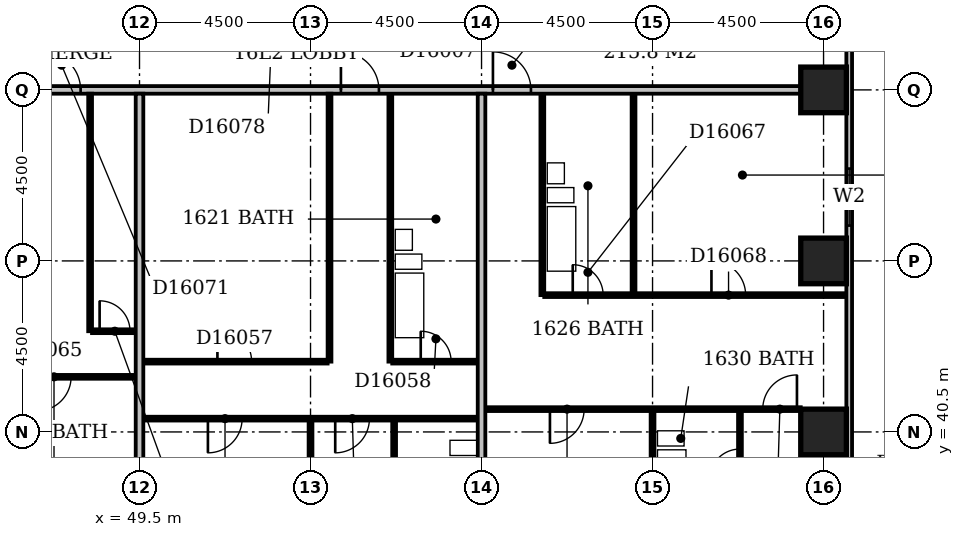
"""IFC4 building model, lengths in metres.
Left out: names, types, materials, properties, quantities, classifications, styles, units other than length and angle.
Written with IfcOpenShell. Run it as: python <this file> out.ifc"""

import sys

from ifc_helpers import new_model, si_unit, direction, frame, frame_2d, origin, origin_2d, place, context, subcontext, project, spatial, rectangle, extrude, element, fill, save


model = new_model("IFC4")
c1 = context("Model", 3, precision=1e-05, world=origin(), true_north=direction((0.0, 1.0)))
c2 = subcontext(c1, "Body", "Model", "MODEL_VIEW")
j1 = project(units=[si_unit("LENGTHUNIT", "METRE"), si_unit("PLANEANGLEUNIT", "RADIAN")], contexts=[c1])
p1 = place(None, origin())
s1 = spatial("IfcSite", under=j1, at=p1, CompositionType="ELEMENT")
p2 = place(p1, origin())
s2 = spatial("IfcBuilding", under=s1, at=p2, CompositionType="ELEMENT")
p3 = place(p2, frame((0.0, 0.0, 68.6)))
s3 = spatial("IfcBuildingStorey", under=s2, at=p3, CompositionType="ELEMENT", Elevation=68.6)
for number, where, z_axis, x_axis in (
    (1, (67.5, 40.5, -0.3), (0.0, 0.0, 1.0), (1.0, 0.0, 0.0)),
    (2, (67.5, 45.0, -0.3), (0.0, 0.0, 1.0), (1.0, 0.0, 0.0)),
    (3, (67.5, 49.5, -0.3), (0.0, 0.0, 1.0), (1.0, 0.0, 0.0)),
):
    element("IfcColumn", number, at=place(p3, frame(where, z_axis=z_axis, x_axis=x_axis)), inside=s3, PredefinedType="COLUMN", context=c2, shape_type="SweptSolid", body=[
        extrude(rectangle(XDim=1.2, YDim=1.2, at=origin_2d()), origin(), (0.0, 0.0, 1.0), 3.6),
    ])
p4 = place(p3, frame((68.175, 35.4, 0.0), z_axis=(0.0, 0.0, 1.0), x_axis=(0.0, 1.0, 0.0)))
e4 = element("IfcWall", 4, at=p4, inside=s3, PredefinedType="STANDARD", context=c2, shape_type="SweptSolid", body=[
    extrude(rectangle(XDim=23.85, YDim=0.15, at=frame_2d((11.925, 0.0))), origin(), (0.0, 0.0, 1.0), 2.7),
])
p5 = place(p4, frame((1.65, 0.0, 0.6)))
e5 = element("IfcOpeningElement", 5, at=p5, cuts=e4, PredefinedType="OPENING", context=c2, shape_type="SweptSolid", body=[
    extrude(rectangle(XDim=2.4, YDim=1.8, at=frame_2d((1.2, 0.9))), frame((0.0, 0.087, 0.0), z_axis=(0.0, -1.0, 0.0), x_axis=(1.0, 0.0, 0.0)), (0.0, 0.0, 1.0), 0.174),
])
p6 = place(p4, frame((10.53, 0.0, 0.6)))
e6 = element("IfcOpeningElement", 6, at=p6, cuts=e4, PredefinedType="OPENING", context=c2, shape_type="SweptSolid", body=[
    extrude(rectangle(XDim=1.5, YDim=1.8, at=frame_2d((0.75, 0.9))), frame((0.0, 0.087, 0.0), z_axis=(0.0, -1.0, 0.0), x_axis=(1.0, 0.0, 0.0)), (0.0, 0.0, 1.0), 0.174),
])
p7 = place(p4, frame((19.65, 0.0, 0.6)))
e7 = element("IfcOpeningElement", 7, at=p7, cuts=e4, PredefinedType="OPENING", context=c2, shape_type="SweptSolid", body=[
    extrude(rectangle(XDim=2.4, YDim=1.8, at=frame_2d((1.2, 0.9))), frame((0.0, 0.087, 0.0), z_axis=(0.0, -1.0, 0.0), x_axis=(1.0, 0.0, 0.0)), (0.0, 0.0, 1.0), 0.174),
])
p8 = place(p3, frame((49.5, 36.6, 0.0), z_axis=(0.0, 0.0, 1.0), x_axis=(0.0, 1.0, 0.0)))
e8 = element("IfcWall", 8, at=p8, inside=s3, PredefinedType="PARTITIONING", context=c2, shape_type="SweptSolid", body=[
    extrude(rectangle(XDim=12.8, YDim=0.2, at=frame_2d((6.4, 0.0))), origin(), (0.0, 0.0, 1.0), 3.3),
])
p9 = place(p3, frame((54.0, 36.6, 0.0), z_axis=(0.0, 0.0, 1.0), x_axis=(0.0, 1.0, 0.0)))
e9 = element("IfcWall", 9, at=p9, inside=s3, PredefinedType="PARTITIONING", context=c2, shape_type="SweptSolid", body=[
    extrude(rectangle(XDim=4.2, YDim=0.1, at=frame_2d((2.1, 0.0))), origin(), (0.0, 0.0, 1.0), 2.6),
])
p10 = place(p3, frame((58.5, 36.6, 0.0), z_axis=(0.0, 0.0, 1.0), x_axis=(0.0, 1.0, 0.0)))
e10 = element("IfcWall", 10, at=p10, inside=s3, PredefinedType="PARTITIONING", context=c2, shape_type="SweptSolid", body=[
    extrude(rectangle(XDim=12.8, YDim=0.2, at=frame_2d((6.4, 0.0))), origin(), (0.0, 0.0, 1.0), 3.3),
])
p11 = place(p3, frame((63.0, 36.6, 0.0), z_axis=(0.0, 0.0, 1.0), x_axis=(0.0, 1.0, 0.0)))
e11 = element("IfcWall", 11, at=p11, inside=s3, PredefinedType="PARTITIONING", context=c2, shape_type="SweptSolid", body=[
    extrude(rectangle(XDim=4.45, YDim=0.1, at=frame_2d((2.225, 0.0))), origin(), (0.0, 0.0, 1.0), 2.4),
])
p12 = place(p3, frame((56.2, 37.95, 0.0), z_axis=(0.0, 0.0, 1.0), x_axis=(0.0, 1.0, 0.0)))
e12 = element("IfcWall", 12, at=p12, inside=s3, PredefinedType="PLUMBINGWALL", context=c2, shape_type="SweptSolid", body=[
    extrude(rectangle(XDim=2.85, YDim=0.1, at=frame_2d((1.425, 0.0))), origin(), (0.0, 0.0, 1.0), 3.3),
])
p13 = place(p12, frame((1.05, 0.0, 0.0)))
e13 = element("IfcOpeningElement", 13, at=p13, cuts=e12, PredefinedType="OPENING", context=c2, shape_type="SweptSolid", body=[
    extrude(rectangle(XDim=0.8, YDim=2.1, at=frame_2d((0.4, 1.05))), frame((0.0, 0.062, 0.0), z_axis=(0.0, -1.0, 0.0), x_axis=(1.0, 0.0, 0.0)), (0.0, 0.0, 1.0), 0.124),
])
p14 = place(p3, frame((65.3, 38.2, 0.0), z_axis=(0.0, 0.0, 1.0), x_axis=(0.0, 1.0, 0.0)))
e14 = element("IfcWall", 14, at=p14, inside=s3, PredefinedType="PLUMBINGWALL", context=c2, shape_type="SweptSolid", body=[
    extrude(rectangle(XDim=2.85, YDim=0.1, at=frame_2d((1.425, 0.0))), origin(), (0.0, 0.0, 1.0), 3.3),
])
p15 = place(p14, frame((1.05, 0.0, 0.0)))
e15 = element("IfcOpeningElement", 15, at=p15, cuts=e14, PredefinedType="OPENING", context=c2, shape_type="SweptSolid", body=[
    extrude(rectangle(XDim=0.8, YDim=2.1, at=frame_2d((0.4, 1.05))), frame((0.0, 0.062, 0.0), z_axis=(0.0, -1.0, 0.0), x_axis=(1.0, 0.0, 0.0)), (0.0, 0.0, 1.0), 0.124),
])
p16 = place(p3, frame((49.6, 40.85, 0.0), z_axis=(0.0, 0.0, 1.0), x_axis=(1.0, 0.0, 0.0)))
e16 = element("IfcWall", 16, at=p16, inside=s3, PredefinedType="PARTITIONING", context=c2, shape_type="SweptSolid", body=[
    extrude(rectangle(XDim=8.8, YDim=0.1, at=frame_2d((4.4, 0.0))), origin(), (0.0, 0.0, 1.0), 3.3),
])
p17 = place(p16, frame((1.7, 0.0, 0.0)))
e17 = element("IfcOpeningElement", 17, at=p17, cuts=e16, PredefinedType="OPENING", context=c2, shape_type="SweptSolid", body=[
    extrude(rectangle(XDim=0.9, YDim=2.1, at=frame_2d((0.45, 1.05))), frame((0.0, 0.062, 0.0), z_axis=(0.0, -1.0, 0.0), x_axis=(1.0, 0.0, 0.0)), (0.0, 0.0, 1.0), 0.124),
])
p18 = place(p16, frame((5.05, 0.0, 0.0)))
e18 = element("IfcOpeningElement", 18, at=p18, cuts=e16, PredefinedType="OPENING", context=c2, shape_type="SweptSolid", body=[
    extrude(rectangle(XDim=0.9, YDim=2.1, at=frame_2d((0.45, 1.05))), frame((0.0, 0.062, 0.0), z_axis=(0.0, -1.0, 0.0), x_axis=(1.0, 0.0, 0.0)), (0.0, 0.0, 1.0), 0.124),
])
p19 = place(p3, frame((58.6, 41.1, 0.0), z_axis=(0.0, 0.0, 1.0), x_axis=(1.0, 0.0, 0.0)))
e19 = element("IfcWall", 19, at=p19, inside=s3, PredefinedType="PARTITIONING", context=c2, shape_type="SweptSolid", body=[
    extrude(rectangle(XDim=8.3, YDim=0.1, at=frame_2d((4.15, 0.0))), origin(), (0.0, 0.0, 1.0), 3.3),
])
p20 = place(p19, frame((1.7, 0.0, 0.0)))
e20 = element("IfcOpeningElement", 20, at=p20, cuts=e19, PredefinedType="OPENING", context=c2, shape_type="SweptSolid", body=[
    extrude(rectangle(XDim=0.9, YDim=2.1, at=frame_2d((0.45, 1.05))), frame((0.0, 0.062, 0.0), z_axis=(0.0, -1.0, 0.0), x_axis=(1.0, 0.0, 0.0)), (0.0, 0.0, 1.0), 0.124),
])
p21 = place(p19, frame((7.3, 0.0, 0.0)))
e21 = element("IfcOpeningElement", 21, at=p21, cuts=e19, PredefinedType="OPENING", context=c2, shape_type="SweptSolid", body=[
    extrude(rectangle(XDim=0.9, YDim=2.1, at=frame_2d((0.45, 1.05))), frame((0.0, 0.062, 0.0), z_axis=(0.0, -1.0, 0.0), x_axis=(1.0, 0.0, 0.0)), (0.0, 0.0, 1.0), 0.124),
])
p22 = place(p3, frame((45.1, 41.95, 0.0), z_axis=(0.0, 0.0, 1.0), x_axis=(1.0, 0.0, 0.0)))
e22 = element("IfcWall", 22, at=p22, inside=s3, PredefinedType="PARTITIONING", context=c2, shape_type="SweptSolid", body=[
    extrude(rectangle(XDim=4.3, YDim=0.1, at=frame_2d((2.15, 0.0))), origin(), (0.0, 0.0, 1.0), 3.3),
])
p23 = place(p22, frame((1.7, 0.0, 0.0)))
e23 = element("IfcOpeningElement", 23, at=p23, cuts=e22, PredefinedType="OPENING", context=c2, shape_type="SweptSolid", body=[
    extrude(rectangle(XDim=0.9, YDim=2.1, at=frame_2d((0.45, 1.05))), frame((0.0, 0.062, 0.0), z_axis=(0.0, -1.0, 0.0), x_axis=(1.0, 0.0, 0.0)), (0.0, 0.0, 1.0), 0.124),
])
p24 = place(p3, frame((49.6, 42.35, 0.0), z_axis=(0.0, 0.0, 1.0), x_axis=(1.0, 0.0, 0.0)))
e24 = element("IfcWall", 24, at=p24, inside=s3, PredefinedType="PARTITIONING", context=c2, shape_type="SweptSolid", body=[
    extrude(rectangle(XDim=4.85, YDim=0.1, at=frame_2d((2.425, 0.0))), origin(), (0.0, 0.0, 1.0), 3.3),
])
p25 = place(p24, frame((1.95, 0.0, 0.0)))
e25 = element("IfcOpeningElement", 25, at=p25, cuts=e24, PredefinedType="OPENING", context=c2, shape_type="SweptSolid", body=[
    extrude(rectangle(XDim=0.9, YDim=2.1, at=frame_2d((0.45, 1.05))), frame((0.0, 0.062, 0.0), z_axis=(0.0, -1.0, 0.0), x_axis=(1.0, 0.0, 0.0)), (0.0, 0.0, 1.0), 0.124),
])
p26 = place(p3, frame((54.5, 42.35, 0.0), z_axis=(0.0, 0.0, 1.0), x_axis=(0.0, 1.0, 0.0)))
e26 = element("IfcWall", 26, at=p26, inside=s3, PredefinedType="PARTITIONING", context=c2, shape_type="SweptSolid", body=[
    extrude(rectangle(XDim=7.05, YDim=0.1, at=frame_2d((3.525, 0.0))), origin(), (0.0, 0.0, 1.0), 2.6),
])
p27 = place(p3, frame((56.1, 42.35, 0.0), z_axis=(0.0, 0.0, 1.0), x_axis=(0.0, 1.0, 0.0)))
e27 = element("IfcWall", 27, at=p27, inside=s3, PredefinedType="PLUMBINGWALL", context=c2, shape_type="SweptSolid", body=[
    extrude(rectangle(XDim=7.05, YDim=0.1, at=frame_2d((3.525, 0.0))), origin(), (0.0, 0.0, 1.0), 3.3),
])
p28 = place(p3, frame((56.15, 42.35, 0.0), z_axis=(0.0, 0.0, 1.0), x_axis=(1.0, 0.0, 0.0)))
e28 = element("IfcWall", 28, at=p28, inside=s3, PredefinedType="PARTITIONING", context=c2, shape_type="SweptSolid", body=[
    extrude(rectangle(XDim=2.25, YDim=0.1, at=frame_2d((1.125, 0.0))), origin(), (0.0, 0.0, 1.0), 3.3),
])
p29 = place(p28, frame((0.75, 0.0, 0.0)))
e29 = element("IfcOpeningElement", 29, at=p29, cuts=e28, PredefinedType="OPENING", context=c2, shape_type="SweptSolid", body=[
    extrude(rectangle(XDim=0.8, YDim=2.1, at=frame_2d((0.4, 1.05))), frame((0.0, 0.062, 0.0), z_axis=(0.0, -1.0, 0.0), x_axis=(1.0, 0.0, 0.0)), (0.0, 0.0, 1.0), 0.124),
])
p30 = place(p3, frame((48.2, 43.15, 0.0), z_axis=(0.0, 0.0, 1.0), x_axis=(0.0, 1.0, 0.0)))
e30 = element("IfcWall", 30, at=p30, inside=s3, PredefinedType="PARTITIONING", context=c2, shape_type="SweptSolid", body=[
    extrude(rectangle(XDim=6.25, YDim=0.1, at=frame_2d((3.125, 0.0))), origin(), (0.0, 0.0, 1.0), 3.3),
])
p31 = place(p3, frame((48.25, 43.15, 0.0), z_axis=(0.0, 0.0, 1.0), x_axis=(1.0, 0.0, 0.0)))
e31 = element("IfcWall", 31, at=p31, inside=s3, PredefinedType="PARTITIONING", context=c2, shape_type="SweptSolid", body=[
    extrude(rectangle(XDim=1.15, YDim=0.1, at=frame_2d((0.575, 0.0))), origin(), (0.0, 0.0, 1.0), 3.3),
])
p32 = place(p31, frame((0.2, 0.0, 0.0)))
e32 = element("IfcOpeningElement", 32, at=p32, cuts=e31, PredefinedType="OPENING", context=c2, shape_type="SweptSolid", body=[
    extrude(rectangle(XDim=0.8, YDim=2.1, at=frame_2d((0.4, 1.05))), frame((0.0, 0.062, 0.0), z_axis=(0.0, -1.0, 0.0), x_axis=(1.0, 0.0, 0.0)), (0.0, 0.0, 1.0), 0.124),
])
p33 = place(p3, frame((60.1, 44.1, 0.0), z_axis=(0.0, 0.0, 1.0), x_axis=(0.0, 1.0, 0.0)))
e33 = element("IfcWall", 33, at=p33, inside=s3, PredefinedType="PLUMBINGWALL", context=c2, shape_type="SweptSolid", body=[
    extrude(rectangle(XDim=5.3, YDim=0.1, at=frame_2d((2.65, 0.0))), origin(), (0.0, 0.0, 1.0), 3.3),
])
p34 = place(p3, frame((60.15, 44.1, 0.0), z_axis=(0.0, 0.0, 1.0), x_axis=(1.0, 0.0, 0.0)))
e34 = element("IfcWall", 34, at=p34, inside=s3, PredefinedType="PARTITIONING", context=c2, shape_type="SweptSolid", body=[
    extrude(rectangle(XDim=7.95, YDim=0.1, at=frame_2d((3.975, 0.0))), origin(), (0.0, 0.0, 1.0), 3.3),
])
p35 = place(p34, frame((0.75, 0.0, 0.0)))
e35 = element("IfcOpeningElement", 35, at=p35, cuts=e34, PredefinedType="OPENING", context=c2, shape_type="SweptSolid", body=[
    extrude(rectangle(XDim=0.8, YDim=2.1, at=frame_2d((0.4, 1.05))), frame((0.0, 0.062, 0.0), z_axis=(0.0, -1.0, 0.0), x_axis=(1.0, 0.0, 0.0)), (0.0, 0.0, 1.0), 0.124),
])
p36 = place(p34, frame((4.4, 0.0, 0.0)))
e36 = element("IfcOpeningElement", 36, at=p36, cuts=e34, PredefinedType="OPENING", context=c2, shape_type="SweptSolid", body=[
    extrude(rectangle(XDim=0.9, YDim=2.1, at=frame_2d((0.45, 1.05))), frame((0.0, 0.062, 0.0), z_axis=(0.0, -1.0, 0.0), x_axis=(1.0, 0.0, 0.0)), (0.0, 0.0, 1.0), 0.124),
])
p37 = place(p3, frame((62.5, 44.15, 0.0), z_axis=(0.0, 0.0, 1.0), x_axis=(0.0, 1.0, 0.0)))
e37 = element("IfcWall", 37, at=p37, inside=s3, PredefinedType="PLUMBINGWALL", context=c2, shape_type="SweptSolid", body=[
    extrude(rectangle(XDim=5.25, YDim=0.1, at=frame_2d((2.625, 0.0))), origin(), (0.0, 0.0, 1.0), 2.4),
])
p38 = place(p3, frame((9.1, 49.5, 0.0), z_axis=(0.0, 0.0, 1.0), x_axis=(1.0, 0.0, 0.0)))
e38 = element("IfcWall", 38, at=p38, inside=s3, PredefinedType="PARTITIONING", context=c2, shape_type="SweptSolid", body=[
    extrude(rectangle(XDim=57.8, YDim=0.2, at=frame_2d((28.9, 0.0))), origin(), (0.0, 0.0, 1.0), 3.3),
])
p39 = place(p38, frame((13.7, 0.0, 0.0)))
e39 = element("IfcOpeningElement", 39, at=p39, cuts=e38, PredefinedType="OPENING", context=c2, shape_type="SweptSolid", body=[
    extrude(rectangle(XDim=1.0, YDim=2.1, at=frame_2d((0.5, 1.05))), frame((0.0, 0.112, 0.0), z_axis=(0.0, -1.0, 0.0), x_axis=(1.0, 0.0, 0.0)), (0.0, 0.0, 1.0), 0.224),
])
p40 = place(p38, frame((32.2, 0.0, 0.0)))
e40 = element("IfcOpeningElement", 40, at=p40, cuts=e38, PredefinedType="OPENING", context=c2, shape_type="SweptSolid", body=[
    extrude(rectangle(XDim=1.0, YDim=2.1, at=frame_2d((0.5, 1.05))), frame((0.0, 0.112, 0.0), z_axis=(0.0, -1.0, 0.0), x_axis=(1.0, 0.0, 0.0)), (0.0, 0.0, 1.0), 0.224),
])
p41 = place(p38, frame((37.85, 0.0, 0.0)))
e41 = element("IfcOpeningElement", 41, at=p41, cuts=e38, PredefinedType="OPENING", context=c2, shape_type="SweptSolid", body=[
    extrude(rectangle(XDim=1.0, YDim=2.1, at=frame_2d((0.5, 1.05))), frame((0.0, 0.112, 0.0), z_axis=(0.0, -1.0, 0.0), x_axis=(1.0, 0.0, 0.0)), (0.0, 0.0, 1.0), 0.224),
])
p42 = place(p38, frame((45.7, 0.0, 0.0)))
e42 = element("IfcOpeningElement", 42, at=p42, cuts=e38, PredefinedType="OPENING", context=c2, shape_type="SweptSolid", body=[
    extrude(rectangle(XDim=1.0, YDim=2.1, at=frame_2d((0.5, 1.05))), frame((0.0, 0.112, 0.0), z_axis=(0.0, -1.0, 0.0), x_axis=(1.0, 0.0, 0.0)), (0.0, 0.0, 1.0), 0.224),
])
p43 = place(p38, frame((49.7, 0.0, 0.0)))
e43 = element("IfcOpeningElement", 43, at=p43, cuts=e38, PredefinedType="OPENING", context=c2, shape_type="SweptSolid", body=[
    extrude(rectangle(XDim=1.0, YDim=2.1, at=frame_2d((0.5, 1.05))), frame((0.0, 0.112, 0.0), z_axis=(0.0, -1.0, 0.0), x_axis=(1.0, 0.0, 0.0)), (0.0, 0.0, 1.0), 0.224),
])
p44 = place(p38, frame((8.4, 0.0, 0.0)))
e44 = element("IfcOpeningElement", 44, at=p44, cuts=e38, PredefinedType="OPENING", context=c2, shape_type="SweptSolid", body=[
    extrude(rectangle(XDim=0.9, YDim=2.1, at=frame_2d((0.45, 1.05))), frame((0.0, 0.112, 0.0), z_axis=(0.0, -1.0, 0.0), x_axis=(1.0, 0.0, 0.0)), (0.0, 0.0, 1.0), 0.224),
])
p45 = place(p6, origin())
e45 = element("IfcWindow", 45, at=p45, inside=s3, PartitioningType="SINGLE_PANEL", PredefinedType="WINDOW", context=c2, shape_type="SweptSolid", body=[
    extrude(rectangle(XDim=1.5, YDim=1.8, at=frame_2d((0.75, 0.9))), frame((0.0, 0.03, 0.0), z_axis=(0.0, -1.0, 0.0), x_axis=(1.0, 0.0, 0.0)), (0.0, 0.0, 1.0), 0.06),
])
fill(e6, e45)
p46 = place(p15, origin())
e46 = element("IfcDoor", 46, at=p46, inside=s3, OperationType="SINGLE_SWING_LEFT", PredefinedType="DOOR", context=c2, shape_type="SweptSolid", body=[
    extrude(rectangle(XDim=0.8, YDim=2.1, at=frame_2d((0.4, 1.05))), frame((0.0, 0.025, 0.0), z_axis=(0.0, -1.0, 0.0), x_axis=(1.0, 0.0, 0.0)), (0.0, 0.0, 1.0), 0.05),
])
fill(e15, e46)
p47 = place(p17, frame((0.9, 0.0, 0.0), z_axis=(0.0, 0.0, 1.0), x_axis=(-1.0, 0.0, 0.0)))
e47 = element("IfcDoor", 47, at=p47, inside=s3, OperationType="SINGLE_SWING_RIGHT", PredefinedType="DOOR", context=c2, shape_type="SweptSolid", body=[
    extrude(rectangle(XDim=0.9, YDim=2.1, at=frame_2d((0.45, 1.05))), frame((0.0, 0.025, 0.0), z_axis=(0.0, -1.0, 0.0), x_axis=(1.0, 0.0, 0.0)), (0.0, 0.0, 1.0), 0.05),
])
fill(e17, e47)
p48 = place(p18, frame((0.9, 0.0, 0.0), z_axis=(0.0, 0.0, 1.0), x_axis=(-1.0, 0.0, 0.0)))
e48 = element("IfcDoor", 48, at=p48, inside=s3, OperationType="SINGLE_SWING_RIGHT", PredefinedType="DOOR", context=c2, shape_type="SweptSolid", body=[
    extrude(rectangle(XDim=0.9, YDim=2.1, at=frame_2d((0.45, 1.05))), frame((0.0, 0.025, 0.0), z_axis=(0.0, -1.0, 0.0), x_axis=(1.0, 0.0, 0.0)), (0.0, 0.0, 1.0), 0.05),
])
fill(e18, e48)
p49 = place(p20, frame((0.9, 0.0, 0.0), z_axis=(0.0, 0.0, 1.0), x_axis=(-1.0, 0.0, 0.0)))
e49 = element("IfcDoor", 49, at=p49, inside=s3, OperationType="SINGLE_SWING_RIGHT", PredefinedType="DOOR", context=c2, shape_type="SweptSolid", body=[
    extrude(rectangle(XDim=0.9, YDim=2.1, at=frame_2d((0.45, 1.05))), frame((0.0, 0.025, 0.0), z_axis=(0.0, -1.0, 0.0), x_axis=(1.0, 0.0, 0.0)), (0.0, 0.0, 1.0), 0.05),
])
fill(e20, e49)
p50 = place(p21, frame((0.9, 0.0, 0.0), z_axis=(0.0, 0.0, 1.0), x_axis=(-1.0, 0.0, 0.0)))
e50 = element("IfcDoor", 50, at=p50, inside=s3, OperationType="SINGLE_SWING_LEFT", PredefinedType="DOOR", context=c2, shape_type="SweptSolid", body=[
    extrude(rectangle(XDim=0.9, YDim=2.1, at=frame_2d((0.45, 1.05))), frame((0.0, 0.025, 0.0), z_axis=(0.0, -1.0, 0.0), x_axis=(1.0, 0.0, 0.0)), (0.0, 0.0, 1.0), 0.05),
])
fill(e21, e50)
p51 = place(p23, frame((0.9, 0.0, 0.0), z_axis=(0.0, 0.0, 1.0), x_axis=(-1.0, 0.0, 0.0)))
e51 = element("IfcDoor", 51, at=p51, inside=s3, OperationType="SINGLE_SWING_RIGHT", PredefinedType="DOOR", context=c2, shape_type="SweptSolid", body=[
    extrude(rectangle(XDim=0.9, YDim=2.1, at=frame_2d((0.45, 1.05))), frame((0.0, 0.025, 0.0), z_axis=(0.0, -1.0, 0.0), x_axis=(1.0, 0.0, 0.0)), (0.0, 0.0, 1.0), 0.05),
])
fill(e23, e51)
p52 = place(p25, origin())
e52 = element("IfcDoor", 52, at=p52, inside=s3, OperationType="SINGLE_SWING_LEFT", PredefinedType="DOOR", context=c2, shape_type="SweptSolid", body=[
    extrude(rectangle(XDim=0.9, YDim=2.1, at=frame_2d((0.45, 1.05))), frame((0.0, 0.025, 0.0), z_axis=(0.0, -1.0, 0.0), x_axis=(1.0, 0.0, 0.0)), (0.0, 0.0, 1.0), 0.05),
])
fill(e25, e52)
p53 = place(p29, origin())
e53 = element("IfcDoor", 53, at=p53, inside=s3, OperationType="SINGLE_SWING_LEFT", PredefinedType="DOOR", context=c2, shape_type="SweptSolid", body=[
    extrude(rectangle(XDim=0.8, YDim=2.1, at=frame_2d((0.4, 1.05))), frame((0.0, 0.025, 0.0), z_axis=(0.0, -1.0, 0.0), x_axis=(1.0, 0.0, 0.0)), (0.0, 0.0, 1.0), 0.05),
])
fill(e29, e53)
p54 = place(p32, origin())
e54 = element("IfcDoor", 54, at=p54, inside=s3, OperationType="SINGLE_SWING_LEFT", PredefinedType="DOOR", context=c2, shape_type="SweptSolid", body=[
    extrude(rectangle(XDim=0.8, YDim=2.1, at=frame_2d((0.4, 1.05))), frame((0.0, 0.025, 0.0), z_axis=(0.0, -1.0, 0.0), x_axis=(1.0, 0.0, 0.0)), (0.0, 0.0, 1.0), 0.05),
])
fill(e32, e54)
p55 = place(p35, origin())
e55 = element("IfcDoor", 55, at=p55, inside=s3, OperationType="SINGLE_SWING_LEFT", PredefinedType="DOOR", context=c2, shape_type="SweptSolid", body=[
    extrude(rectangle(XDim=0.8, YDim=2.1, at=frame_2d((0.4, 1.05))), frame((0.0, 0.025, 0.0), z_axis=(0.0, -1.0, 0.0), x_axis=(1.0, 0.0, 0.0)), (0.0, 0.0, 1.0), 0.05),
])
fill(e35, e55)
p56 = place(p36, origin())
e56 = element("IfcDoor", 56, at=p56, inside=s3, OperationType="SINGLE_SWING_LEFT", PredefinedType="DOOR", context=c2, shape_type="SweptSolid", body=[
    extrude(rectangle(XDim=0.9, YDim=2.1, at=frame_2d((0.45, 1.05))), frame((0.0, 0.025, 0.0), z_axis=(0.0, -1.0, 0.0), x_axis=(1.0, 0.0, 0.0)), (0.0, 0.0, 1.0), 0.05),
])
fill(e36, e56)
p57 = place(p41, origin())
e57 = element("IfcDoor", 57, at=p57, inside=s3, OperationType="SINGLE_SWING_LEFT", PredefinedType="DOOR", context=c2, shape_type="SweptSolid", body=[
    extrude(rectangle(XDim=1.0, YDim=2.1, at=frame_2d((0.5, 1.05))), frame((0.0, 0.025, 0.0), z_axis=(0.0, -1.0, 0.0), x_axis=(1.0, 0.0, 0.0)), (0.0, 0.0, 1.0), 0.05),
])
fill(e41, e57)
p58 = place(p42, origin())
e58 = element("IfcDoor", 58, at=p58, inside=s3, OperationType="SINGLE_SWING_LEFT", PredefinedType="DOOR", context=c2, shape_type="SweptSolid", body=[
    extrude(rectangle(XDim=1.0, YDim=2.1, at=frame_2d((0.5, 1.05))), frame((0.0, 0.025, 0.0), z_axis=(0.0, -1.0, 0.0), x_axis=(1.0, 0.0, 0.0)), (0.0, 0.0, 1.0), 0.05),
])
fill(e42, e58)
p59 = place(p43, origin())
e59 = element("IfcDoor", 59, at=p59, inside=s3, OperationType="SINGLE_SWING_LEFT", PredefinedType="DOOR", context=c2, shape_type="SweptSolid", body=[
    extrude(rectangle(XDim=1.0, YDim=2.1, at=frame_2d((0.5, 1.05))), frame((0.0, 0.025, 0.0), z_axis=(0.0, -1.0, 0.0), x_axis=(1.0, 0.0, 0.0)), (0.0, 0.0, 1.0), 0.05),
])
fill(e43, e59)
save(model, sys.argv[1])
